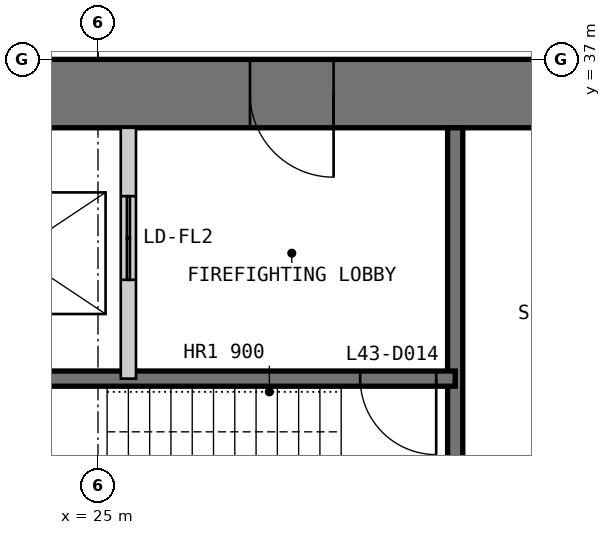
"""IFC4 building model, lengths in metres.
Left out: names, types, materials, properties, quantities, classifications, styles, units other than length and angle.
Written with IfcOpenShell. Run it as: python <this file> out.ifc"""

import sys

from ifc_helpers import new_model, si_unit, direction, frame, frame_2d, origin, place, context, subcontext, project, spatial, polyline, rectangle, outline, extrude, element, fill, save


model = new_model("IFC4")
c1 = context("Model", 3, precision=1e-05, world=origin(), true_north=direction((0.0, 1.0)))
c2 = subcontext(c1, "Body", "Model", "MODEL_VIEW")
j1 = project(units=[si_unit("LENGTHUNIT", "METRE"), si_unit("PLANEANGLEUNIT", "RADIAN")], contexts=[c1])
p1 = place(None, origin())
s1 = spatial("IfcSite", under=j1, at=p1, CompositionType="ELEMENT")
p2 = place(p1, origin())
s2 = spatial("IfcBuilding", under=s1, at=p2, CompositionType="ELEMENT")
p3 = place(p2, frame((0.0, 0.0, 185.8)))
s3 = spatial("IfcBuildingStorey", under=s2, at=p3, CompositionType="ELEMENT", Elevation=185.8)
p4 = place(p3, frame((37.0, 36.55, 0.0), z_axis=(0.0, 0.0, 1.0), x_axis=(-1.0, 0.0, 0.0)))
e1 = element("IfcWall", 1, at=p4, inside=s3, PredefinedType="SHEAR", context=c2, shape_type="SweptSolid", body=[
    extrude(outline(polyline([(0.0, -0.45), (24.0, -0.45), (23.1, 0.45), (0.9, 0.45), (0.0, -0.45)])), origin(), (0.0, 0.0, 1.0), 4.0),
])
p5 = place(p4, frame((4.9, 0.0, 0.0)))
e2 = element("IfcOpeningElement", 2, at=p5, cuts=e1, PredefinedType="OPENING", context=c2, shape_type="SweptSolid", body=[
    extrude(rectangle(XDim=1.0, YDim=2.2, at=frame_2d((0.5, 1.1))), frame((0.0, 0.46, 0.0), z_axis=(0.0, -1.0, 0.0), x_axis=(1.0, 0.0, 0.0)), (0.0, 0.0, 1.0), 0.92),
])
p6 = place(p4, frame((8.9, 0.0, 0.0)))
e3 = element("IfcOpeningElement", 3, at=p6, cuts=e1, PredefinedType="OPENING", context=c2, shape_type="SweptSolid", body=[
    extrude(rectangle(XDim=1.1, YDim=2.2, at=frame_2d((0.55, 1.1))), frame((0.0, 0.46, 0.0), z_axis=(0.0, -1.0, 0.0), x_axis=(1.0, 0.0, 0.0)), (0.0, 0.0, 1.0), 0.92),
])
p7 = place(p4, frame((15.05, 0.0, 0.0)))
e4 = element("IfcOpeningElement", 4, at=p7, cuts=e1, PredefinedType="OPENING", context=c2, shape_type="SweptSolid", body=[
    extrude(rectangle(XDim=0.9, YDim=2.2, at=frame_2d((0.45, 1.1))), frame((0.0, 0.46, 0.0), z_axis=(0.0, -1.0, 0.0), x_axis=(1.0, 0.0, 0.0)), (0.0, 0.0, 1.0), 0.92),
])
p8 = place(p4, frame((17.9, 0.0, 0.0)))
e5 = element("IfcOpeningElement", 5, at=p8, cuts=e1, PredefinedType="OPENING", context=c2, shape_type="SweptSolid", body=[
    extrude(rectangle(XDim=1.0, YDim=2.2, at=frame_2d((0.5, 1.1))), frame((0.0, 0.46, 0.0), z_axis=(0.0, -1.0, 0.0), x_axis=(1.0, 0.0, 0.0)), (0.0, 0.0, 1.0), 0.92),
])
p9 = place(p4, frame((21.4, 0.0, 0.0)))
e6 = element("IfcOpeningElement", 6, at=p9, cuts=e1, PredefinedType="OPENING", context=c2, shape_type="SweptSolid", body=[
    extrude(rectangle(XDim=1.0, YDim=2.2, at=frame_2d((0.5, 1.1))), frame((0.0, 0.46, 0.0), z_axis=(0.0, -1.0, 0.0), x_axis=(1.0, 0.0, 0.0)), (0.0, 0.0, 1.0), 0.92),
])
p10 = place(p3, frame((29.7, 36.1, 0.0), z_axis=(0.0, 0.0, 1.0), x_axis=(0.0, -1.0, 0.0)))
e7 = element("IfcWall", 7, at=p10, inside=s3, PredefinedType="SOLIDWALL", context=c2, shape_type="SweptSolid", body=[
    extrude(rectangle(XDim=16.1, YDim=0.2, at=frame_2d((8.05, 0.0))), origin(), (0.0, 0.0, 1.0), 3.8),
])
p11 = place(p10, frame((7.217, 0.0, 0.0)))
e8 = element("IfcOpeningElement", 8, at=p11, cuts=e7, PredefinedType="OPENING", context=c2, shape_type="SweptSolid", body=[
    extrude(rectangle(XDim=1.1, YDim=2.2, at=frame_2d((0.55, 1.1))), frame((0.0, 0.11, 0.0), z_axis=(0.0, -1.0, 0.0), x_axis=(1.0, 0.0, 0.0)), (0.0, 0.0, 1.0), 0.22),
])
p12 = place(p10, frame((10.55, 0.0, 0.0)))
e9 = element("IfcOpeningElement", 9, at=p12, cuts=e7, PredefinedType="OPENING", context=c2, shape_type="SweptSolid", body=[
    extrude(rectangle(XDim=1.1, YDim=2.2, at=frame_2d((0.55, 1.1))), frame((0.0, 0.11, 0.0), z_axis=(0.0, -1.0, 0.0), x_axis=(1.0, 0.0, 0.0)), (0.0, 0.0, 1.0), 0.22),
])
p13 = place(p10, frame((13.883, 0.0, 0.0)))
e10 = element("IfcOpeningElement", 10, at=p13, cuts=e7, PredefinedType="OPENING", context=c2, shape_type="SweptSolid", body=[
    extrude(rectangle(XDim=1.1, YDim=2.2, at=frame_2d((0.55, 1.1))), frame((0.0, 0.11, 0.0), z_axis=(0.0, -1.0, 0.0), x_axis=(1.0, 0.0, 0.0)), (0.0, 0.0, 1.0), 0.22),
])
p14 = place(p3, frame((29.7, 32.8, 0.0), z_axis=(0.0, 0.0, 1.0), x_axis=(-1.0, 0.0, 0.0)))
e11 = element("IfcWall", 11, at=p14, inside=s3, PredefinedType="SOLIDWALL", context=c2, shape_type="SweptSolid", body=[
    extrude(rectangle(XDim=9.4, YDim=0.2, at=frame_2d((4.7, 0.0))), origin(), (0.0, 0.0, 1.0), 3.8),
])
p15 = place(p14, frame((0.25, 0.0, 0.0)))
e12 = element("IfcOpeningElement", 12, at=p15, cuts=e11, PredefinedType="OPENING", context=c2, shape_type="SweptSolid", body=[
    extrude(rectangle(XDim=1.0, YDim=2.2, at=frame_2d((0.5, 1.1))), frame((0.0, 0.11, 0.0), z_axis=(0.0, -1.0, 0.0), x_axis=(1.0, 0.0, 0.0)), (0.0, 0.0, 1.0), 0.22),
])
p16 = place(p3, frame((25.4, 36.1, 0.0), z_axis=(0.0, 0.0, 1.0), x_axis=(0.0, -1.0, 0.0)))
e13 = element("IfcWall", 13, at=p16, inside=s3, PredefinedType="PARTITIONING", context=c2, shape_type="SweptSolid", body=[
    extrude(rectangle(XDim=3.3, YDim=0.2, at=frame_2d((1.65, 0.0))), origin(), (0.0, 0.0, 1.0), 3.8),
])
p17 = place(p16, frame((0.9, 0.0, 0.0)))
e14 = element("IfcOpeningElement", 14, at=p17, cuts=e13, PredefinedType="OPENING", context=c2, shape_type="SweptSolid", body=[
    extrude(rectangle(XDim=1.1, YDim=2.2, at=frame_2d((0.55, 1.1))), frame((0.0, 0.11, 0.0), z_axis=(0.0, -1.0, 0.0), x_axis=(1.0, 0.0, 0.0)), (0.0, 0.0, 1.0), 0.22),
])
p18 = place(p6, origin())
e15 = element("IfcDoor", 15, at=p18, inside=s3, OperationType="SINGLE_SWING_LEFT", PredefinedType="DOOR", context=c2, shape_type="SweptSolid", body=[
    extrude(rectangle(XDim=1.1, YDim=2.2, at=frame_2d((0.55, 1.1))), frame((0.0, 0.025, 0.0), z_axis=(0.0, -1.0, 0.0), x_axis=(1.0, 0.0, 0.0)), (0.0, 0.0, 1.0), 0.05),
    extrude(outline(polyline([(0.0, 0.0), (0.04, 0.0), (0.04, 2.16), (1.06, 2.16), (1.06, 0.0), (1.1, 0.0), (1.1, 2.2), (0.0, 2.2), (0.0, 0.0)])), frame((0.0, 0.3, 0.0), z_axis=(0.0, -1.0, 0.0), x_axis=(1.0, 0.0, 0.0)), (0.0, 0.0, 1.0), 0.6),
])
fill(e3, e15)
p19 = place(p15, origin())
e16 = element("IfcDoor", 16, at=p19, inside=s3, OperationType="SINGLE_SWING_LEFT", PredefinedType="DOOR", context=c2, shape_type="SweptSolid", body=[
    extrude(rectangle(XDim=1.0, YDim=2.2, at=frame_2d((0.5, 1.1))), frame((0.0, 0.025, 0.0), z_axis=(0.0, -1.0, 0.0), x_axis=(1.0, 0.0, 0.0)), (0.0, 0.0, 1.0), 0.05),
])
fill(e12, e16)
p20 = place(p17, origin())
e17 = element("IfcDoor", 17, at=p20, inside=s3, OperationType="DOUBLE_DOOR_SLIDING", PredefinedType="DOOR", context=c2, shape_type="SweptSolid", body=[
    extrude(rectangle(XDim=1.1, YDim=2.2, at=frame_2d((0.55, 1.1))), frame((0.0, 0.025, 0.0), z_axis=(0.0, -1.0, 0.0), x_axis=(1.0, 0.0, 0.0)), (0.0, 0.0, 1.0), 0.05),
])
fill(e14, e17)
save(model, sys.argv[1])
